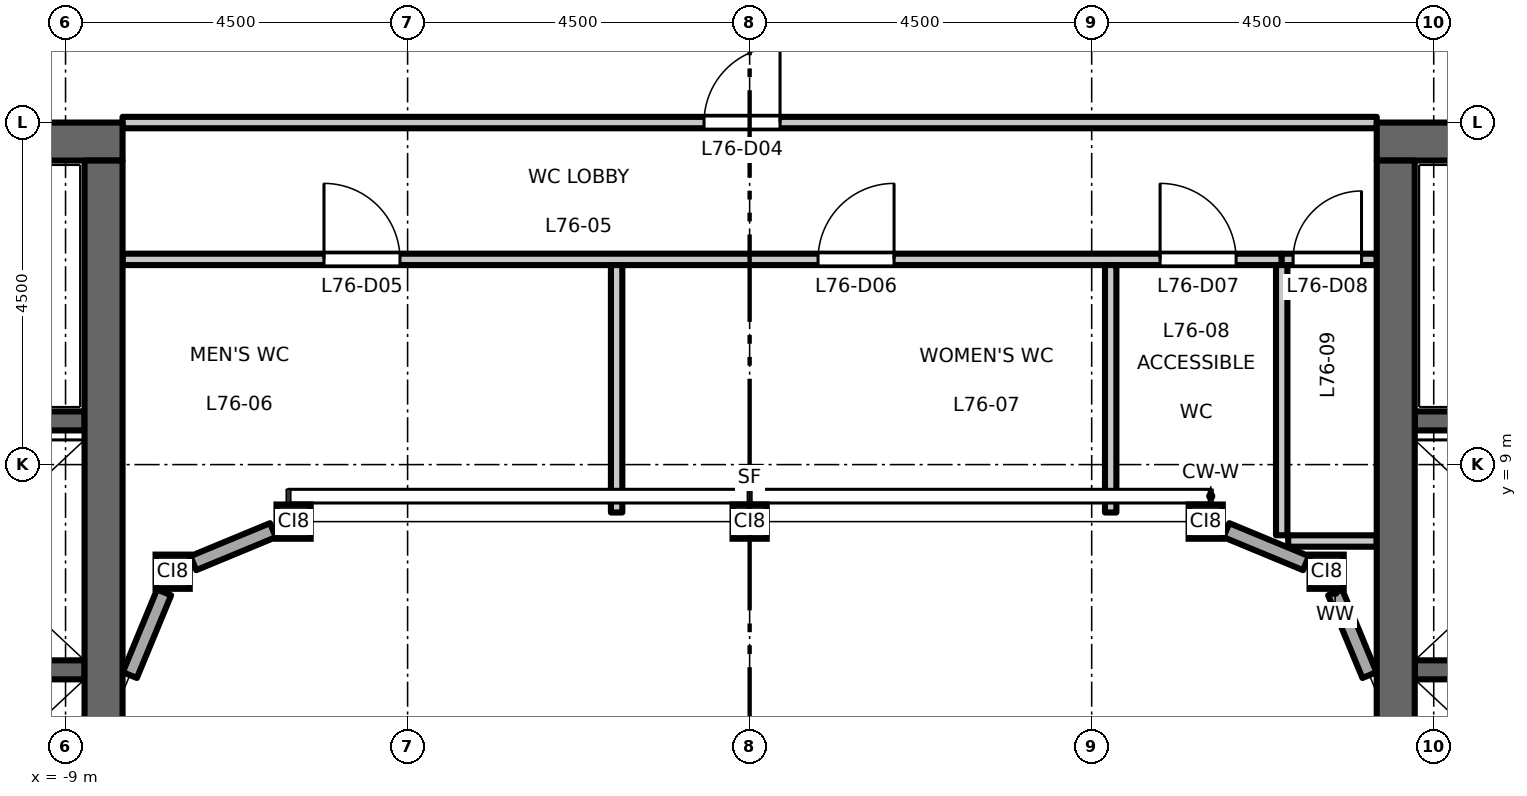
"""IFC4 building model, lengths in metres.
Left out: names, types, materials, properties, quantities, classifications, styles, units other than length and angle.
Written with IfcOpenShell. Run it as: python <this file> out.ifc"""

import sys

from ifc_helpers import new_model, si_unit, direction, frame, frame_2d, origin, origin_2d, place, context, subcontext, project, spatial, rectangle, hollow_rectangle, extrude, element, fill, save


model = new_model("IFC4")
c1 = context("Model", 3, precision=1e-05, world=origin(), true_north=direction((0.0, 1.0)))
c2 = subcontext(c1, "Body", "Model", "MODEL_VIEW")
j1 = project(units=[si_unit("LENGTHUNIT", "METRE"), si_unit("PLANEANGLEUNIT", "RADIAN")], contexts=[c1])
p1 = place(None, origin())
s1 = spatial("IfcSite", under=j1, at=p1, CompositionType="ELEMENT")
p2 = place(p1, origin())
s2 = spatial("IfcBuilding", under=s1, at=p2, CompositionType="ELEMENT")
p3 = place(p2, frame((0.0, 0.0, 353.2)))
s3 = spatial("IfcBuildingStorey", under=s2, at=p3, CompositionType="ELEMENT", Elevation=353.2)
for number, where, z_axis, x_axis in (
    (1, (-7.591, 7.591, 0.0), (0.0, 0.0, 1.0), (1.0, 0.0, 0.0)),
    (2, (-6.0, 8.25, 0.0), (0.0, 0.0, 1.0), (1.0, 0.0, 0.0)),
    (3, (0.0, 8.25, 0.0), (0.0, 0.0, 1.0), (1.0, 0.0, 0.0)),
    (4, (6.0, 8.25, 0.0), (0.0, 0.0, 1.0), (1.0, 0.0, 0.0)),
    (5, (7.591, 7.591, 0.0), (0.0, 0.0, 1.0), (1.0, 0.0, 0.0)),
):
    element("IfcColumn", number, at=place(p3, frame(where, z_axis=z_axis, x_axis=x_axis)), inside=s3, PredefinedType="COLUMN", context=c2, shape_type="SweptSolid", body=[
        extrude(hollow_rectangle(XDim=0.45, YDim=0.45, WallThickness=0.022, at=origin_2d()), origin(), (0.0, 0.0, 1.0), 5.0),
    ])
p4 = place(p3, frame((-8.75, 6.3, 0.0), z_axis=(0.0, 0.0, 1.0), x_axis=(-1.0, 0.0, 0.0)))
e6 = element("IfcWall", 6, at=p4, inside=s3, PredefinedType="SHEAR", context=c2, shape_type="SweptSolid", body=[
    extrude(rectangle(XDim=3.1, YDim=0.25, at=frame_2d((1.55, 0.0))), origin(), (0.0, 0.0, 1.0), 4.8),
])
p5 = place(p3, frame((-8.75, 9.575, 0.0), z_axis=(0.0, 0.0, 1.0), x_axis=(-1.0, 0.0, 0.0)))
e7 = element("IfcWall", 7, at=p5, inside=s3, PredefinedType="SHEAR", context=c2, shape_type="SweptSolid", body=[
    extrude(rectangle(XDim=8.0, YDim=0.25, at=frame_2d((4.0, 0.0))), origin(), (0.0, 0.0, 1.0), 4.8),
])
p6 = place(p5, frame((6.65, 0.0, 0.0)))
e8 = element("IfcOpeningElement", 8, at=p6, cuts=e7, PredefinedType="OPENING", context=c2, shape_type="SweptSolid", body=[
    extrude(rectangle(XDim=1.1, YDim=2.1, at=frame_2d((0.55, 1.05))), frame((0.0, 0.135, 0.0), z_axis=(0.0, -1.0, 0.0), x_axis=(1.0, 0.0, 0.0)), (0.0, 0.0, 1.0), 0.27),
])
p7 = place(p3, frame((-8.25, 13.25, 0.0), z_axis=(0.0, 0.0, 1.0), x_axis=(-1.0, 0.0, 0.0)))
e9 = element("IfcWall", 9, at=p7, inside=s3, PredefinedType="SHEAR", context=c2, shape_type="SweptSolid", body=[
    extrude(rectangle(XDim=9.0, YDim=0.5, at=frame_2d((4.5, 0.0))), origin(), (0.0, 0.0, 1.0), 4.8),
])
p8 = place(p3, frame((-8.5, -13.0, 0.0), z_axis=(0.0, 0.0, 1.0), x_axis=(0.0, 1.0, 0.0)))
e10 = element("IfcWall", 10, at=p8, inside=s3, PredefinedType="SHEAR", context=c2, shape_type="SweptSolid", body=[
    extrude(rectangle(XDim=26.0, YDim=0.5, at=frame_2d((13.0, 0.0))), origin(), (0.0, 0.0, 1.0), 4.8),
])
p9 = place(p3, frame((8.75, 6.3, 0.0), z_axis=(0.0, 0.0, 1.0), x_axis=(1.0, 0.0, 0.0)))
e11 = element("IfcWall", 11, at=p9, inside=s3, PredefinedType="SHEAR", context=c2, shape_type="SweptSolid", body=[
    extrude(rectangle(XDim=3.1, YDim=0.25, at=frame_2d((1.55, 0.0))), origin(), (0.0, 0.0, 1.0), 4.8),
])
p10 = place(p3, frame((8.75, 9.575, 0.0), z_axis=(0.0, 0.0, 1.0), x_axis=(1.0, 0.0, 0.0)))
e12 = element("IfcWall", 12, at=p10, inside=s3, PredefinedType="SHEAR", context=c2, shape_type="SweptSolid", body=[
    extrude(rectangle(XDim=8.0, YDim=0.25, at=frame_2d((4.0, 0.0))), origin(), (0.0, 0.0, 1.0), 4.8),
])
p11 = place(p10, frame((6.65, 0.0, 0.0)))
e13 = element("IfcOpeningElement", 13, at=p11, cuts=e12, PredefinedType="OPENING", context=c2, shape_type="SweptSolid", body=[
    extrude(rectangle(XDim=1.1, YDim=2.1, at=frame_2d((0.55, 1.05))), frame((0.0, 0.135, 0.0), z_axis=(0.0, -1.0, 0.0), x_axis=(1.0, 0.0, 0.0)), (0.0, 0.0, 1.0), 0.27),
])
p12 = place(p3, frame((8.25, 13.25, 0.0), z_axis=(0.0, 0.0, 1.0), x_axis=(1.0, 0.0, 0.0)))
e14 = element("IfcWall", 14, at=p12, inside=s3, PredefinedType="SHEAR", context=c2, shape_type="SweptSolid", body=[
    extrude(rectangle(XDim=9.0, YDim=0.5, at=frame_2d((4.5, 0.0))), origin(), (0.0, 0.0, 1.0), 4.8),
])
p13 = place(p3, frame((8.5, -13.0, 0.0), z_axis=(0.0, 0.0, 1.0), x_axis=(0.0, 1.0, 0.0)))
e15 = element("IfcWall", 15, at=p13, inside=s3, PredefinedType="SHEAR", context=c2, shape_type="SweptSolid", body=[
    extrude(rectangle(XDim=26.0, YDim=0.5, at=frame_2d((13.0, 0.0))), origin(), (0.0, 0.0, 1.0), 4.8),
])
p14 = place(p3, frame((8.154, 6.231, 0.0), z_axis=(0.0, 0.0, 1.0), x_axis=(-0.382760542083, 0.92384758885, 0.0)))
e16 = element("IfcWall", 16, at=p14, inside=s3, PredefinedType="STANDARD", context=c2, shape_type="SweptSolid", body=[
    extrude(rectangle(XDim=1.178, YDim=0.2, at=frame_2d((0.589, 0.0))), origin(), (0.0, 0.0, 1.0), 4.46),
])
for number, where, z_axis, x_axis in (
    (17, (7.319, 7.703, 0.0), (0.0, 0.0, 1.0), (-0.924, 0.383, 0.0)),
    (18, (-6.271, 8.137, 0.0), (0.0, 0.0, 1.0), (-0.924, -0.383, 0.0)),
):
    element("IfcWall", number, at=place(p3, frame(where, z_axis=z_axis, x_axis=x_axis)), inside=s3, PredefinedType="STANDARD", context=c2, shape_type="SweptSolid", body=[
        extrude(rectangle(XDim=1.134, YDim=0.2, at=frame_2d((0.567, 0.0))), origin(), (0.0, 0.0, 1.0), 4.46),
    ])
p15 = place(p3, frame((-7.703, 7.319, 0.0), z_axis=(0.0, 0.0, 1.0), x_axis=(-0.382760542083, -0.92384758885, 0.0)))
e19 = element("IfcWall", 19, at=p15, inside=s3, PredefinedType="STANDARD", context=c2, shape_type="SweptSolid", body=[
    extrude(rectangle(XDim=1.178, YDim=0.2, at=frame_2d((0.589, 0.0))), origin(), (0.0, 0.0, 1.0), 4.46),
])
p16 = place(p3, frame((7.085, 7.995, 0.0), z_axis=(0.0, 0.0, 1.0), x_axis=(1.0, 0.0, 0.0)))
e20 = element("IfcWall", 20, at=p16, inside=s3, PredefinedType="PARTITIONING", context=c2, shape_type="SweptSolid", body=[
    extrude(rectangle(XDim=1.165, YDim=0.15, at=frame_2d((0.583, 0.0))), origin(), (0.0, 0.0, 1.0), 4.8),
])
p17 = place(p3, frame((-8.25, 11.7, 0.0), z_axis=(0.0, 0.0, 1.0), x_axis=(1.0, 0.0, 0.0)))
e21 = element("IfcWall", 21, at=p17, inside=s3, PredefinedType="PARTITIONING", context=c2, shape_type="SweptSolid", body=[
    extrude(rectangle(XDim=15.25, YDim=0.15, at=frame_2d((7.625, 0.0))), origin(), (0.0, 0.0, 1.0), 4.8),
])
p18 = place(p17, frame((2.65, 0.0, 0.0)))
e22 = element("IfcOpeningElement", 22, at=p18, cuts=e21, PredefinedType="OPENING", context=c2, shape_type="SweptSolid", body=[
    extrude(rectangle(XDim=1.0, YDim=2.1, at=frame_2d((0.5, 1.05))), frame((0.0, 0.085, 0.0), z_axis=(0.0, -1.0, 0.0), x_axis=(1.0, 0.0, 0.0)), (0.0, 0.0, 1.0), 0.17),
])
p19 = place(p17, frame((9.15, 0.0, 0.0)))
e23 = element("IfcOpeningElement", 23, at=p19, cuts=e21, PredefinedType="OPENING", context=c2, shape_type="SweptSolid", body=[
    extrude(rectangle(XDim=1.0, YDim=2.1, at=frame_2d((0.5, 1.05))), frame((0.0, 0.085, 0.0), z_axis=(0.0, -1.0, 0.0), x_axis=(1.0, 0.0, 0.0)), (0.0, 0.0, 1.0), 0.17),
])
p20 = place(p17, frame((13.65, 0.0, 0.0)))
e24 = element("IfcOpeningElement", 24, at=p20, cuts=e21, PredefinedType="OPENING", context=c2, shape_type="SweptSolid", body=[
    extrude(rectangle(XDim=1.0, YDim=2.1, at=frame_2d((0.5, 1.05))), frame((0.0, 0.085, 0.0), z_axis=(0.0, -1.0, 0.0), x_axis=(1.0, 0.0, 0.0)), (0.0, 0.0, 1.0), 0.17),
])
p21 = place(p3, frame((7.0, 11.7, 0.0), z_axis=(0.0, 0.0, 1.0), x_axis=(1.0, 0.0, 0.0)))
e25 = element("IfcWall", 25, at=p21, inside=s3, PredefinedType="PARTITIONING", context=c2, shape_type="SweptSolid", body=[
    extrude(rectangle(XDim=1.25, YDim=0.15, at=frame_2d((0.625, 0.0))), origin(), (0.0, 0.0, 1.0), 4.8),
])
p22 = place(p21, frame((0.15, 0.0, 0.0)))
e26 = element("IfcOpeningElement", 26, at=p22, cuts=e25, PredefinedType="OPENING", context=c2, shape_type="SweptSolid", body=[
    extrude(rectangle(XDim=0.9, YDim=2.1, at=frame_2d((0.45, 1.05))), frame((0.0, 0.085, 0.0), z_axis=(0.0, -1.0, 0.0), x_axis=(1.0, 0.0, 0.0)), (0.0, 0.0, 1.0), 0.17),
])
p23 = place(p3, frame((-8.25, 13.5, 0.0), z_axis=(0.0, 0.0, 1.0), x_axis=(1.0, 0.0, 0.0)))
e27 = element("IfcWall", 27, at=p23, inside=s3, PredefinedType="PARTITIONING", context=c2, shape_type="SweptSolid", body=[
    extrude(rectangle(XDim=16.5, YDim=0.15, at=frame_2d((8.25, 0.0))), origin(), (0.0, 0.0, 1.0), 4.8),
])
p24 = place(p23, frame((7.65, 0.0, 0.0)))
e28 = element("IfcOpeningElement", 28, at=p24, cuts=e27, PredefinedType="OPENING", context=c2, shape_type="SweptSolid", body=[
    extrude(rectangle(XDim=1.0, YDim=2.1, at=frame_2d((0.5, 1.05))), frame((0.0, 0.085, 0.0), z_axis=(0.0, -1.0, 0.0), x_axis=(1.0, 0.0, 0.0)), (0.0, 0.0, 1.0), 0.17),
])
for number, where, z_axis, x_axis in (
    (29, (-1.75, 8.37, 0.0), (0.0, 0.0, 1.0), (0.0, 1.0, 0.0)),
    (30, (4.75, 8.37, 0.0), (0.0, 0.0, 1.0), (0.0, 1.0, 0.0)),
):
    element("IfcWall", number, at=place(p3, frame(where, z_axis=z_axis, x_axis=x_axis)), inside=s3, PredefinedType="PARTITIONING", context=c2, shape_type="SweptSolid", body=[
        extrude(rectangle(XDim=3.255, YDim=0.15, at=frame_2d((1.627, 0.0))), origin(), (0.0, 0.0, 1.0), 4.8),
    ])
p25 = place(p3, frame((7.0, 8.07, 0.0), z_axis=(0.0, 0.0, 1.0), x_axis=(0.0, 1.0, 0.0)))
e31 = element("IfcWall", 31, at=p25, inside=s3, PredefinedType="PARTITIONING", context=c2, shape_type="SweptSolid", body=[
    extrude(rectangle(XDim=3.555, YDim=0.15, at=frame_2d((1.777, 0.0))), origin(), (0.0, 0.0, 1.0), 4.8),
])
p26 = place(p24, origin())
e32 = element("IfcDoor", 32, at=p26, inside=s3, OperationType="SINGLE_SWING_RIGHT", PredefinedType="DOOR", context=c2, shape_type="SweptSolid", body=[
    extrude(rectangle(XDim=1.0, YDim=2.1, at=frame_2d((0.5, 1.05))), frame((0.0, 0.025, 0.0), z_axis=(0.0, -1.0, 0.0), x_axis=(1.0, 0.0, 0.0)), (0.0, 0.0, 1.0), 0.05),
])
fill(e28, e32)
p27 = place(p18, origin())
e33 = element("IfcDoor", 33, at=p27, inside=s3, OperationType="SINGLE_SWING_LEFT", PredefinedType="DOOR", context=c2, shape_type="SweptSolid", body=[
    extrude(rectangle(XDim=1.0, YDim=2.1, at=frame_2d((0.5, 1.05))), frame((0.0, 0.025, 0.0), z_axis=(0.0, -1.0, 0.0), x_axis=(1.0, 0.0, 0.0)), (0.0, 0.0, 1.0), 0.05),
])
fill(e22, e33)
p28 = place(p19, origin())
e34 = element("IfcDoor", 34, at=p28, inside=s3, OperationType="SINGLE_SWING_RIGHT", PredefinedType="DOOR", context=c2, shape_type="SweptSolid", body=[
    extrude(rectangle(XDim=1.0, YDim=2.1, at=frame_2d((0.5, 1.05))), frame((0.0, 0.025, 0.0), z_axis=(0.0, -1.0, 0.0), x_axis=(1.0, 0.0, 0.0)), (0.0, 0.0, 1.0), 0.05),
])
fill(e23, e34)
p29 = place(p20, origin())
e35 = element("IfcDoor", 35, at=p29, inside=s3, OperationType="SINGLE_SWING_LEFT", PredefinedType="DOOR", context=c2, shape_type="SweptSolid", body=[
    extrude(rectangle(XDim=1.0, YDim=2.1, at=frame_2d((0.5, 1.05))), frame((0.0, 0.025, 0.0), z_axis=(0.0, -1.0, 0.0), x_axis=(1.0, 0.0, 0.0)), (0.0, 0.0, 1.0), 0.05),
])
fill(e24, e35)
p30 = place(p22, origin())
e36 = element("IfcDoor", 36, at=p30, inside=s3, OperationType="SINGLE_SWING_RIGHT", PredefinedType="DOOR", context=c2, shape_type="SweptSolid", body=[
    extrude(rectangle(XDim=0.9, YDim=2.1, at=frame_2d((0.45, 1.05))), frame((0.0, 0.025, 0.0), z_axis=(0.0, -1.0, 0.0), x_axis=(1.0, 0.0, 0.0)), (0.0, 0.0, 1.0), 0.05),
])
fill(e26, e36)
save(model, sys.argv[1])
